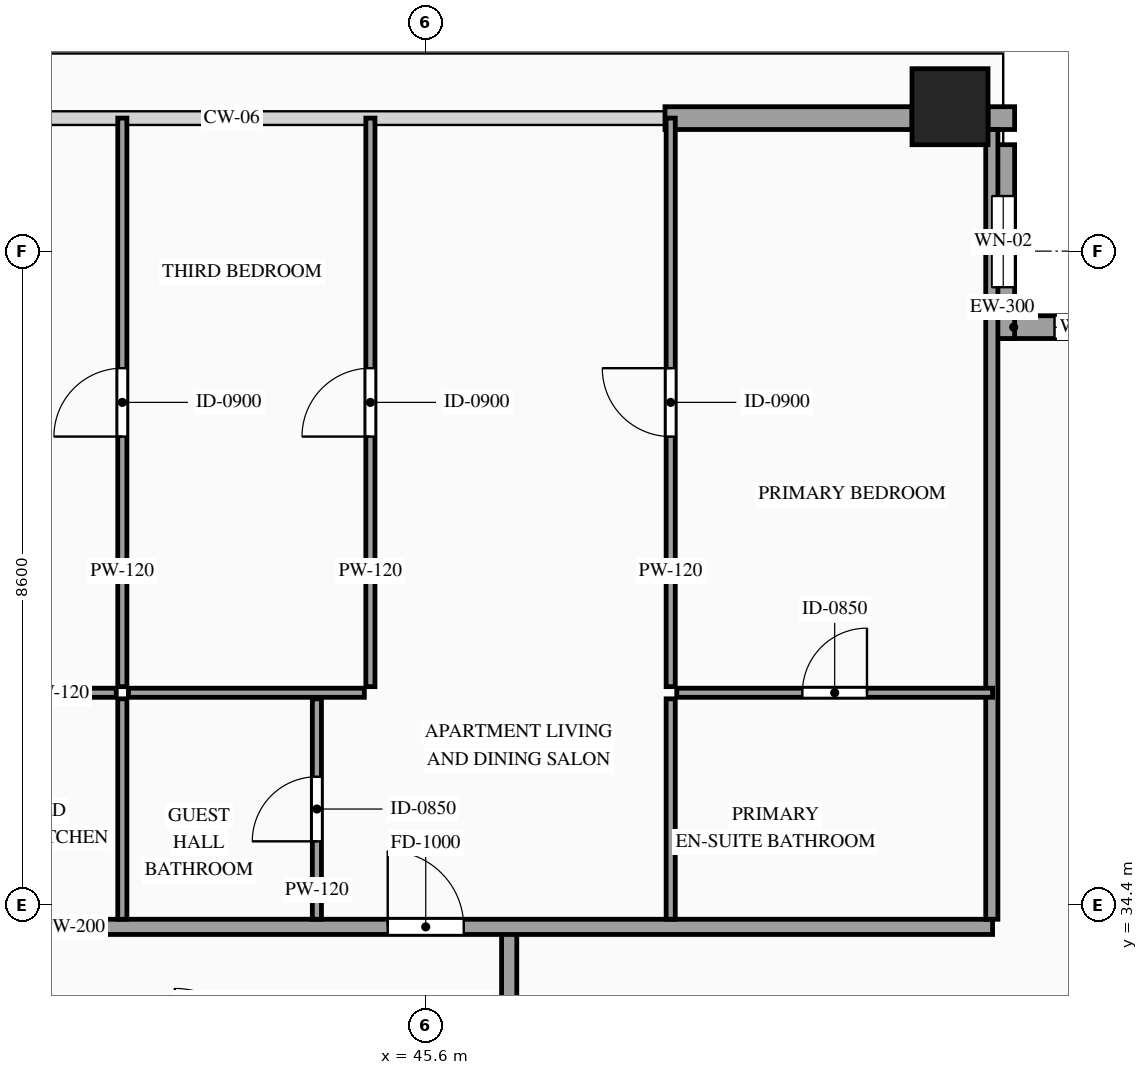
"""IFC4 building model, lengths in metres.
Left out: names, types, materials, properties, quantities, classifications, styles, units other than length and angle.
Written with IfcOpenShell. Run it as: python <this file> out.ifc"""

import sys

from ifc_helpers import new_model, si_unit, direction, frame, frame_2d, origin, origin_2d, place, context, subcontext, project, spatial, rectangle, hollow_rectangle, extrude, source, transform, mapped, element, fill, save


model = new_model("IFC4")
c1 = context("Model", 3, precision=1e-05, world=origin(), true_north=direction((0.0, 1.0)))
c2 = subcontext(c1, "Body", "Model", "MODEL_VIEW")
j1 = project(units=[si_unit("LENGTHUNIT", "METRE"), si_unit("PLANEANGLEUNIT", "RADIAN")], contexts=[c1])
p1 = place(None, origin())
s1 = spatial("IfcSite", under=j1, at=p1, CompositionType="ELEMENT")
p2 = place(p1, origin())
s2 = spatial("IfcBuilding", under=s1, at=p2, CompositionType="ELEMENT")
p3 = place(p2, frame((0.0, 0.0, 296.1)))
s3 = spatial("IfcBuildingStorey", under=s2, at=p3, CompositionType="ELEMENT", Elevation=296.1)
m1 = source(origin(), c2, "Body", "SweptSolid", [
    extrude(hollow_rectangle(XDim=1.0, YDim=1.0, WallThickness=0.048, at=origin_2d()), origin(), (0.0, 0.0, 1.0), 3.5),
])
p4 = place(p3, frame((52.5, 44.9, 0.0), z_axis=(0.0, 0.0, 1.0), x_axis=(1.0, 0.0, 0.0)))
e1 = element("IfcColumn", 1, at=p4, inside=s3, PredefinedType="COLUMN", context=c2, shape_type="MappedRepresentation", body=[
    mapped(m1, transform((0.0, 0.0, 0.0), scale=1.0)),
])
p5 = place(p3, frame((55.6, 42.0, 0.0), z_axis=(0.0, 0.0, 1.0), x_axis=(-1.0, 0.0, 0.0)))
e2 = element("IfcWall", 2, at=p5, inside=s3, PredefinedType="SOLIDWALL", context=c2, shape_type="SweptSolid", body=[
    extrude(rectangle(XDim=2.55, YDim=0.3, at=frame_2d((1.275, 0.0))), origin(), (0.0, 0.0, 1.0), 3.28),
])
p6 = place(p5, frame((0.825, 0.0, 0.85)))
e3 = element("IfcOpeningElement", 3, at=p6, cuts=e2, PredefinedType="OPENING", context=c2, shape_type="SweptSolid", body=[
    extrude(rectangle(XDim=0.9, YDim=1.5, at=frame_2d((0.45, 0.75))), frame((0.0, 0.165, 0.0), z_axis=(0.0, -1.0, 0.0), x_axis=(1.0, 0.0, 0.0)), (0.0, 0.0, 1.0), 0.33),
])
p7 = place(p3, frame((53.2, 41.85, 0.0), z_axis=(0.0, 0.0, 1.0), x_axis=(0.0, 1.0, 0.0)))
e4 = element("IfcWall", 4, at=p7, inside=s3, PredefinedType="SOLIDWALL", context=c2, shape_type="SweptSolid", body=[
    extrude(rectangle(XDim=2.55, YDim=0.3, at=frame_2d((1.275, 0.0))), origin(), (0.0, 0.0, 1.0), 3.28),
])
p8 = place(p7, frame((0.675, 0.0, 0.85)))
e5 = element("IfcOpeningElement", 5, at=p8, cuts=e4, PredefinedType="OPENING", context=c2, shape_type="SweptSolid", body=[
    extrude(rectangle(XDim=1.2, YDim=2.1, at=frame_2d((0.6, 1.05))), frame((0.0, 0.165, 0.0), z_axis=(0.0, -1.0, 0.0), x_axis=(1.0, 0.0, 0.0)), (0.0, 0.0, 1.0), 0.33),
])
m2 = source(origin(), c2, "Body", "SweptSolid", [
    extrude(rectangle(XDim=0.35, YDim=0.3, at=frame_2d((0.175, 0.0))), origin(), (0.0, 0.0, 1.0), 3.28),
])
p9 = place(p3, frame((53.0, 44.75, 0.0), z_axis=(0.0, 0.0, 1.0), x_axis=(1.0, 0.0, 0.0)))
e6 = element("IfcWall", 6, at=p9, inside=s3, PredefinedType="SOLIDWALL", context=c2, shape_type="MappedRepresentation", body=[
    mapped(m2, transform((0.0, 0.0, 0.0), scale=1.0)),
])
m3 = source(origin(), c2, "Body", "SweptSolid", [
    extrude(rectangle(XDim=3.25, YDim=0.3, at=frame_2d((1.625, 0.0))), origin(), (0.0, 0.0, 1.0), 2.885),
])
p10 = place(p3, frame((48.75, 44.75, 0.0), z_axis=(0.0, 0.0, 1.0), x_axis=(1.0, 0.0, 0.0)))
e7 = element("IfcWall", 7, at=p10, inside=s3, PredefinedType="SOLIDWALL", context=c2, shape_type="MappedRepresentation", body=[
    mapped(m3, transform((0.0, 0.0, 0.0), scale=1.0)),
])
m4 = source(origin(), c2, "Body", "SweptSolid", [
    extrude(rectangle(XDim=1.7, YDim=0.2, at=frame_2d((0.85, 0.0))), origin(), (0.0, 0.0, 1.0), 3.28),
])
p11 = place(p3, frame((46.7, 32.35, 0.0), z_axis=(0.0, 0.0, 1.0), x_axis=(0.0, 1.0, 0.0)))
e8 = element("IfcWall", 8, at=p11, inside=s3, PredefinedType="PARTITIONING", context=c2, shape_type="MappedRepresentation", body=[
    mapped(m4, transform((0.0, 0.0, 0.0), scale=1.0)),
])
p12 = place(p3, frame((37.08, 34.11, 0.0), z_axis=(0.0, 0.0, 1.0), x_axis=(1.0, 0.0, 0.0)))
e9 = element("IfcWall", 9, at=p12, inside=s3, PredefinedType="PARTITIONING", context=c2, shape_type="SweptSolid", body=[
    extrude(rectangle(XDim=15.98, YDim=0.2, at=frame_2d((7.99, 0.0))), origin(), (0.0, 0.0, 1.0), 3.28),
])
p13 = place(p12, frame((8.022, 0.0, 0.0)))
e10 = element("IfcOpeningElement", 10, at=p13, cuts=e9, PredefinedType="OPENING", context=c2, shape_type="SweptSolid", body=[
    extrude(rectangle(XDim=1.0, YDim=2.2, at=frame_2d((0.5, 1.1))), frame((0.0, 0.115, 0.0), z_axis=(0.0, -1.0, 0.0), x_axis=(1.0, 0.0, 0.0)), (0.0, 0.0, 1.0), 0.23),
])
m5 = source(origin(), c2, "Body", "SweptSolid", [
    extrude(rectangle(XDim=10.39, YDim=0.16, at=frame_2d((5.195, 0.0))), origin(), (0.0, 0.0, 1.0), 3.28),
])
p14 = place(p3, frame((53.05, 34.21, 0.0), z_axis=(0.0, 0.0, 1.0), x_axis=(0.0, 1.0, 0.0)))
e11 = element("IfcWall", 11, at=p14, inside=s3, PredefinedType="PARTITIONING", context=c2, shape_type="MappedRepresentation", body=[
    mapped(m5, transform((0.0, 0.0, 0.0), scale=1.0)),
])
p15 = place(p3, frame((37.08, 37.19, 0.0), z_axis=(0.0, 0.0, 1.0), x_axis=(1.0, 0.0, 0.0)))
e12 = element("IfcWall", 12, at=p15, inside=s3, PredefinedType="PARTITIONING", context=c2, shape_type="SweptSolid", body=[
    extrude(rectangle(XDim=4.45, YDim=0.12, at=frame_2d((2.225, 0.0))), origin(), (0.0, 0.0, 1.0), 3.28),
])
p16 = place(p15, frame((1.8, 0.0, 0.0)))
e13 = element("IfcOpeningElement", 13, at=p16, cuts=e12, PredefinedType="OPENING", context=c2, shape_type="SweptSolid", body=[
    extrude(rectangle(XDim=0.85, YDim=2.1, at=frame_2d((0.425, 1.05))), frame((0.0, 0.075, 0.0), z_axis=(0.0, -1.0, 0.0), x_axis=(1.0, 0.0, 0.0)), (0.0, 0.0, 1.0), 0.15),
])
m6 = source(origin(), c2, "Body", "SweptSolid", [
    extrude(rectangle(XDim=2.9, YDim=0.12, at=frame_2d((1.45, 0.0))), origin(), (0.0, 0.0, 1.0), 3.28),
])
p17 = place(p3, frame((41.61, 34.21, 0.0), z_axis=(0.0, 0.0, 1.0), x_axis=(0.0, 1.0, 0.0)))
e14 = element("IfcWall", 14, at=p17, inside=s3, PredefinedType="PARTITIONING", context=c2, shape_type="MappedRepresentation", body=[
    mapped(m6, transform((0.0, 0.0, 0.0), scale=1.0)),
])
p18 = place(p3, frame((44.17, 34.21, 0.0), z_axis=(0.0, 0.0, 1.0), x_axis=(0.0, 1.0, 0.0)))
e15 = element("IfcWall", 15, at=p18, inside=s3, PredefinedType="PARTITIONING", context=c2, shape_type="SweptSolid", body=[
    extrude(rectangle(XDim=2.9, YDim=0.12, at=frame_2d((1.45, 0.0))), origin(), (0.0, 0.0, 1.0), 3.28),
])
p19 = place(p18, frame((1.025, 0.0, 0.0)))
e16 = element("IfcOpeningElement", 16, at=p19, cuts=e15, PredefinedType="OPENING", context=c2, shape_type="SweptSolid", body=[
    extrude(rectangle(XDim=0.85, YDim=2.1, at=frame_2d((0.425, 1.05))), frame((0.0, 0.075, 0.0), z_axis=(0.0, -1.0, 0.0), x_axis=(1.0, 0.0, 0.0)), (0.0, 0.0, 1.0), 0.15),
])
p20 = place(p3, frame((48.905, 37.19, 0.0), z_axis=(0.0, 0.0, 1.0), x_axis=(1.0, 0.0, 0.0)))
e17 = element("IfcWall", 17, at=p20, inside=s3, PredefinedType="PARTITIONING", context=c2, shape_type="SweptSolid", body=[
    extrude(rectangle(XDim=4.155, YDim=0.12, at=frame_2d((2.078, 0.0))), origin(), (0.0, 0.0, 1.0), 3.28),
])
p21 = place(p20, frame((1.653, 0.0, 0.0)))
e18 = element("IfcOpeningElement", 18, at=p21, cuts=e17, PredefinedType="OPENING", context=c2, shape_type="SweptSolid", body=[
    extrude(rectangle(XDim=0.85, YDim=2.1, at=frame_2d((0.425, 1.05))), frame((0.0, 0.075, 0.0), z_axis=(0.0, -1.0, 0.0), x_axis=(1.0, 0.0, 0.0)), (0.0, 0.0, 1.0), 0.15),
])
p22 = place(p3, frame((48.825, 34.21, 0.0), z_axis=(0.0, 0.0, 1.0), x_axis=(0.0, 1.0, 0.0)))
e19 = element("IfcWall", 19, at=p22, inside=s3, PredefinedType="PARTITIONING", context=c2, shape_type="MappedRepresentation", body=[
    mapped(m6, transform((0.0, 0.0, 0.0), scale=1.0)),
])
p23 = place(p3, frame((41.61, 37.27, 0.0), z_axis=(0.0, 0.0, 1.0), x_axis=(0.0, 1.0, 0.0)))
e20 = element("IfcWall", 20, at=p23, inside=s3, PredefinedType="PARTITIONING", context=c2, shape_type="SweptSolid", body=[
    extrude(rectangle(XDim=7.48, YDim=0.12, at=frame_2d((3.74, 0.0))), origin(), (0.0, 0.0, 1.0), 3.28),
])
p24 = place(p23, frame((3.29, 0.0, 0.0)))
e21 = element("IfcOpeningElement", 21, at=p24, cuts=e20, PredefinedType="OPENING", context=c2, shape_type="SweptSolid", body=[
    extrude(rectangle(XDim=0.9, YDim=2.15, at=frame_2d((0.45, 1.075))), frame((0.0, 0.075, 0.0), z_axis=(0.0, -1.0, 0.0), x_axis=(1.0, 0.0, 0.0)), (0.0, 0.0, 1.0), 0.15),
])
p25 = place(p3, frame((48.825, 37.27, 0.0), z_axis=(0.0, 0.0, 1.0), x_axis=(0.0, 1.0, 0.0)))
e22 = element("IfcWall", 22, at=p25, inside=s3, PredefinedType="PARTITIONING", context=c2, shape_type="SweptSolid", body=[
    extrude(rectangle(XDim=7.48, YDim=0.12, at=frame_2d((3.74, 0.0))), origin(), (0.0, 0.0, 1.0), 3.28),
])
p26 = place(p25, frame((3.29, 0.0, 0.0)))
e23 = element("IfcOpeningElement", 23, at=p26, cuts=e22, PredefinedType="OPENING", context=c2, shape_type="SweptSolid", body=[
    extrude(rectangle(XDim=0.9, YDim=2.15, at=frame_2d((0.45, 1.075))), frame((0.0, 0.075, 0.0), z_axis=(0.0, -1.0, 0.0), x_axis=(1.0, 0.0, 0.0)), (0.0, 0.0, 1.0), 0.15),
])
m7 = source(origin(), c2, "Body", "SweptSolid", [
    extrude(rectangle(XDim=3.104, YDim=0.12, at=frame_2d((1.552, 0.0))), origin(), (0.0, 0.0, 1.0), 3.28),
])
p27 = place(p3, frame((41.69, 37.19, 0.0), z_axis=(0.0, 0.0, 1.0), x_axis=(1.0, 0.0, 0.0)))
e24 = element("IfcWall", 24, at=p27, inside=s3, PredefinedType="PARTITIONING", context=c2, shape_type="MappedRepresentation", body=[
    mapped(m7, transform((0.0, 0.0, 0.0), scale=1.0)),
])
p28 = place(p3, frame((44.874, 37.27, 0.0), z_axis=(0.0, 0.0, 1.0), x_axis=(0.0, 1.0, 0.0)))
e25 = element("IfcWall", 25, at=p28, inside=s3, PredefinedType="PARTITIONING", context=c2, shape_type="SweptSolid", body=[
    extrude(rectangle(XDim=7.48, YDim=0.12, at=frame_2d((3.74, 0.0))), origin(), (0.0, 0.0, 1.0), 3.28),
])
p29 = place(p28, frame((3.29, 0.0, 0.0)))
e26 = element("IfcOpeningElement", 26, at=p29, cuts=e25, PredefinedType="OPENING", context=c2, shape_type="SweptSolid", body=[
    extrude(rectangle(XDim=0.9, YDim=2.15, at=frame_2d((0.45, 1.075))), frame((0.0, 0.075, 0.0), z_axis=(0.0, -1.0, 0.0), x_axis=(1.0, 0.0, 0.0)), (0.0, 0.0, 1.0), 0.15),
])
m8 = source(origin(), c2, "Body", "SweptSolid", [
    extrude(rectangle(XDim=0.9, YDim=1.5, at=frame_2d((0.45, 0.75))), frame((0.0, 0.03, 0.0), z_axis=(0.0, -1.0, 0.0), x_axis=(1.0, 0.0, 0.0)), (0.0, 0.0, 1.0), 0.06),
])
p30 = place(p6, origin())
e27 = element("IfcWindow", 27, at=p30, inside=s3, PartitioningType="SINGLE_PANEL", PredefinedType="WINDOW", context=c2, shape_type="MappedRepresentation", body=[
    mapped(m8, transform((0.0, 0.0, 0.0), scale=1.0)),
])
fill(e3, e27)
m9 = source(origin(), c2, "Body", "SweptSolid", [
    extrude(rectangle(XDim=1.2, YDim=2.1, at=frame_2d((0.6, 1.05))), frame((0.0, 0.03, 0.0), z_axis=(0.0, -1.0, 0.0), x_axis=(1.0, 0.0, 0.0)), (0.0, 0.0, 1.0), 0.06),
])
p31 = place(p8, origin())
e28 = element("IfcWindow", 28, at=p31, inside=s3, PartitioningType="SINGLE_PANEL", PredefinedType="WINDOW", context=c2, shape_type="MappedRepresentation", body=[
    mapped(m9, transform((0.0, 0.0, 0.0), scale=1.0)),
])
fill(e5, e28)
m10 = source(origin(), c2, "Body", "SweptSolid", [
    extrude(rectangle(XDim=1.0, YDim=2.2, at=frame_2d((0.5, 1.1))), frame((0.0, 0.025, 0.0), z_axis=(0.0, -1.0, 0.0), x_axis=(1.0, 0.0, 0.0)), (0.0, 0.0, 1.0), 0.05),
])
p32 = place(p13, origin())
e29 = element("IfcDoor", 29, at=p32, inside=s3, OperationType="SINGLE_SWING_LEFT", PredefinedType="DOOR", context=c2, shape_type="MappedRepresentation", body=[
    mapped(m10, transform((0.0, 0.0, 0.0), scale=1.0)),
])
fill(e10, e29)
m11 = source(origin(), c2, "Body", "SweptSolid", [
    extrude(rectangle(XDim=0.85, YDim=2.1, at=frame_2d((0.425, 1.05))), frame((0.0, 0.025, 0.0), z_axis=(0.0, -1.0, 0.0), x_axis=(1.0, 0.0, 0.0)), (0.0, 0.0, 1.0), 0.05),
])
p33 = place(p19, origin())
e30 = element("IfcDoor", 30, at=p33, inside=s3, OperationType="SINGLE_SWING_LEFT", PredefinedType="DOOR", context=c2, shape_type="MappedRepresentation", body=[
    mapped(m11, transform((0.0, 0.0, 0.0), scale=1.0)),
])
fill(e16, e30)
p34 = place(p21, origin())
e31 = element("IfcDoor", 31, at=p34, inside=s3, OperationType="SINGLE_SWING_RIGHT", PredefinedType="DOOR", context=c2, shape_type="MappedRepresentation", body=[
    mapped(m11, transform((0.0, 0.0, 0.0), scale=1.0)),
])
fill(e18, e31)
m12 = source(origin(), c2, "Body", "SweptSolid", [
    extrude(rectangle(XDim=0.9, YDim=2.15, at=frame_2d((0.45, 1.075))), frame((0.0, 0.025, 0.0), z_axis=(0.0, -1.0, 0.0), x_axis=(1.0, 0.0, 0.0)), (0.0, 0.0, 1.0), 0.05),
])
p35 = place(p24, origin())
e32 = element("IfcDoor", 32, at=p35, inside=s3, OperationType="SINGLE_SWING_LEFT", PredefinedType="DOOR", context=c2, shape_type="MappedRepresentation", body=[
    mapped(m12, transform((0.0, 0.0, 0.0), scale=1.0)),
])
fill(e21, e32)
p36 = place(p26, origin())
e33 = element("IfcDoor", 33, at=p36, inside=s3, OperationType="SINGLE_SWING_RIGHT", PredefinedType="DOOR", context=c2, shape_type="MappedRepresentation", body=[
    mapped(m12, transform((0.0, 0.0, 0.0), scale=1.0)),
])
fill(e23, e33)
p37 = place(p29, origin())
e34 = element("IfcDoor", 34, at=p37, inside=s3, OperationType="SINGLE_SWING_LEFT", PredefinedType="DOOR", context=c2, shape_type="MappedRepresentation", body=[
    mapped(m12, transform((0.0, 0.0, 0.0), scale=1.0)),
])
fill(e26, e34)
save(model, sys.argv[1])
